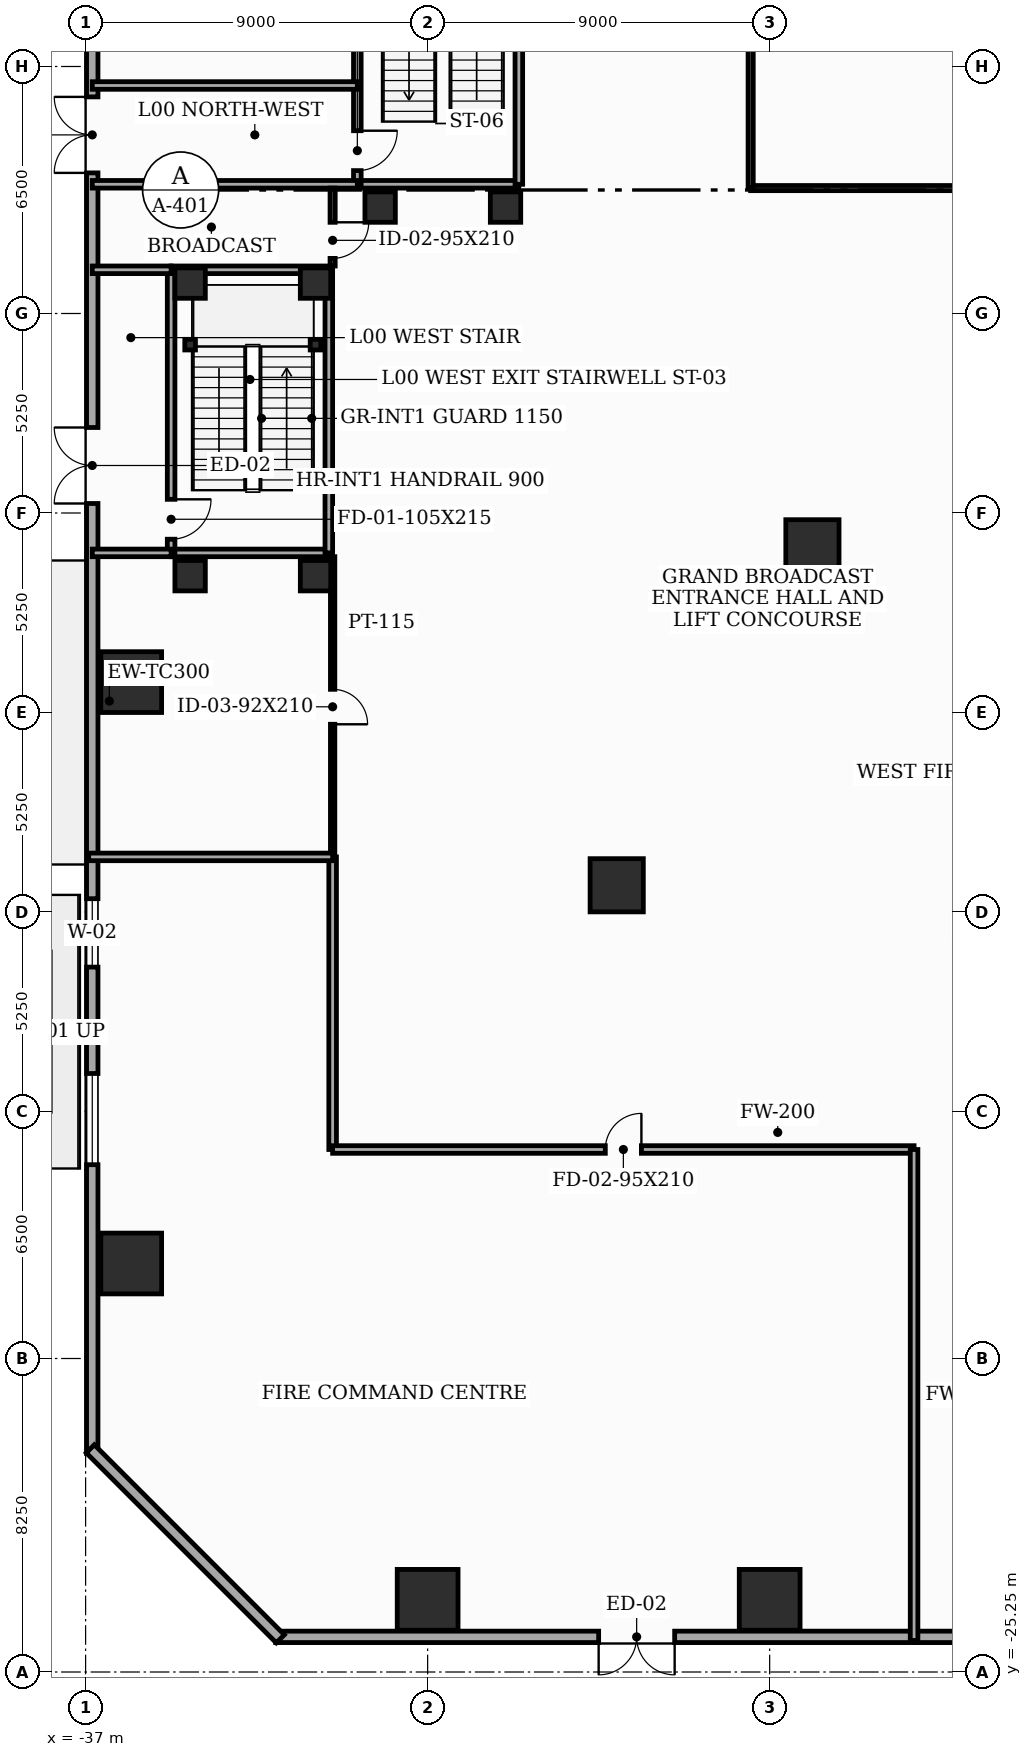
"""IFC4 building model, lengths in metres.
Left out: names, types, materials, properties, quantities, classifications, styles, units other than length and angle.
Written with IfcOpenShell. Run it as: python <this file> out.ifc"""

import sys

from ifc_helpers import new_model, si_unit, direction, frame, frame_2d, origin, origin_2d, place, context, subcontext, project, spatial, rectangle, i_section, extrude, element, fill, save


model = new_model("IFC4")
c1 = context("Model", 3, precision=1e-05, world=origin(), true_north=direction((0.0, 1.0)))
c2 = subcontext(c1, "Body", "Model", "MODEL_VIEW")
j1 = project(units=[si_unit("LENGTHUNIT", "METRE"), si_unit("PLANEANGLEUNIT", "RADIAN")], contexts=[c1])
p1 = place(None, origin())
s1 = spatial("IfcSite", under=j1, at=p1, CompositionType="ELEMENT")
p2 = place(p1, origin())
s2 = spatial("IfcBuilding", under=s1, at=p2, CompositionType="ELEMENT")
p3 = place(p2, origin())
s3 = spatial("IfcBuildingStorey", under=s2, at=p3, CompositionType="ELEMENT", Elevation=0.0)
for number, where, z_axis, x_axis in (
    (1, (-28.0, -23.35, 0.0), (0.0, 0.0, 1.0), (1.0, 0.0, 0.0)),
    (2, (-19.0, -23.35, 0.0), (0.0, 0.0, 1.0), (1.0, 0.0, 0.0)),
    (3, (-35.8, 0.8, 0.0), (0.0, 0.0, 1.0), (1.0, 0.0, 0.0)),
    (4, (-35.8, -14.5, 0.0), (0.0, 0.0, 1.0), (1.0, 0.0, 0.0)),
):
    element("IfcColumn", number, at=place(p3, frame(where, z_axis=z_axis, x_axis=x_axis)), inside=s3, PredefinedType="COLUMN", context=c2, shape_type="SweptSolid", body=[
        extrude(rectangle(XDim=1.6, YDim=1.6, at=origin_2d()), origin(), (0.0, 0.0, 1.0), 5.2),
    ])
for number, where, z_axis, x_axis in (
    (5, (-17.875, 4.373, 0.0), (0.0, 0.0, 1.0), (1.0, 0.0, 0.0)),
    (6, (-23.025, -4.547, 0.0), (0.0, 0.0, 1.0), (1.0, 0.0, 0.0)),
):
    element("IfcColumn", number, at=place(p3, frame(where, z_axis=z_axis, x_axis=x_axis)), inside=s3, PredefinedType="COLUMN", context=c2, shape_type="SweptSolid", body=[
        extrude(rectangle(XDim=1.4, YDim=1.4, at=origin_2d()), origin(), (0.0, 0.0, 1.0), 5.2),
    ])
for number, where, z_axis, x_axis in (
    (7, (-34.25, 3.6, 0.0), (0.0, 0.0, 1.0), (1.0, 0.0, 0.0)),
    (8, (-30.95, 3.6, 0.0), (0.0, 0.0, 1.0), (1.0, 0.0, 0.0)),
    (9, (-30.95, 11.3, 0.0), (0.0, 0.0, 1.0), (1.0, 0.0, 0.0)),
    (10, (-34.25, 11.3, 0.0), (0.0, 0.0, 1.0), (1.0, 0.0, 0.0)),
):
    element("IfcColumn", number, at=place(p3, frame(where, z_axis=z_axis, x_axis=x_axis)), inside=s3, PredefinedType="COLUMN", context=c2, shape_type="SweptSolid", body=[
        extrude(rectangle(XDim=0.8, YDim=0.8, at=origin_2d()), origin(), (0.0, 0.0, 1.0), 5.2),
    ])
for number, where, z_axis, x_axis in (
    (11, (-34.25, 9.68, 0.0), (0.0, 0.0, 1.0), (1.0, 0.0, 0.0)),
    (12, (-30.95, 9.68, 0.0), (0.0, 0.0, 1.0), (1.0, 0.0, 0.0)),
):
    element("IfcColumn", number, at=place(p3, frame(where, z_axis=z_axis, x_axis=x_axis)), inside=s3, PredefinedType="PILASTER", context=c2, shape_type="SweptSolid", body=[
        extrude(i_section(OverallWidth=0.28, OverallDepth=0.28, WebThickness=0.01, FlangeThickness=0.018, at=origin_2d()), origin(), (0.0, 0.0, 1.0), 5.2),
    ])
for number, where, z_axis, x_axis in (
    (13, (-29.25, 13.3, 0.0), (0.0, 0.0, 1.0), (1.0, 0.0, 0.0)),
    (14, (-25.95, 13.3, 0.0), (0.0, 0.0, 1.0), (1.0, 0.0, 0.0)),
):
    element("IfcColumn", number, at=place(p3, frame(where, z_axis=z_axis, x_axis=x_axis)), inside=s3, PredefinedType="COLUMN", context=c2, shape_type="SweptSolid", body=[
        extrude(rectangle(XDim=0.8, YDim=0.8, at=origin_2d()), origin(), (0.0, 0.0, 1.0), 5.2),
    ])
p4 = place(p3, frame((-32.0, -24.325, 0.0), z_axis=(0.0, 0.0, 1.0), x_axis=(1.0, 0.0, 0.0)))
e15 = element("IfcWall", 15, at=p4, inside=s3, PredefinedType="SOLIDWALL", context=c2, shape_type="SweptSolid", body=[
    extrude(rectangle(XDim=64.0, YDim=0.3, at=frame_2d((32.0, 0.0))), origin(), (0.0, 0.0, 1.0), 4.95),
])
p5 = place(p4, frame((8.5, 0.0, 0.0)))
e16 = element("IfcOpeningElement", 16, at=p5, cuts=e15, PredefinedType="OPENING", context=c2, shape_type="SweptSolid", body=[
    extrude(rectangle(XDim=2.0, YDim=2.2, at=frame_2d((1.0, 1.1))), frame((0.0, 0.16, 0.0), z_axis=(0.0, -1.0, 0.0), x_axis=(1.0, 0.0, 0.0)), (0.0, 0.0, 1.0), 0.32),
])
p6 = place(p4, frame((22.8, 0.0, 0.0)))
e17 = element("IfcOpeningElement", 17, at=p6, cuts=e15, PredefinedType="OPENING", context=c2, shape_type="SweptSolid", body=[
    extrude(rectangle(XDim=2.2, YDim=2.4, at=frame_2d((1.1, 1.2))), frame((0.0, 0.16, 0.0), z_axis=(0.0, -1.0, 0.0), x_axis=(1.0, 0.0, 0.0)), (0.0, 0.0, 1.0), 0.32),
])
p7 = place(p4, frame((30.4, 0.0, 0.0)))
e18 = element("IfcOpeningElement", 18, at=p7, cuts=e15, PredefinedType="OPENING", context=c2, shape_type="SweptSolid", body=[
    extrude(rectangle(XDim=2.2, YDim=2.4, at=frame_2d((1.1, 1.2))), frame((0.0, 0.16, 0.0), z_axis=(0.0, -1.0, 0.0), x_axis=(1.0, 0.0, 0.0)), (0.0, 0.0, 1.0), 0.32),
])
p8 = place(p4, frame((38.2, 0.0, 0.0)))
e19 = element("IfcOpeningElement", 19, at=p8, cuts=e15, PredefinedType="OPENING", context=c2, shape_type="SweptSolid", body=[
    extrude(rectangle(XDim=2.0, YDim=2.2, at=frame_2d((1.0, 1.1))), frame((0.0, 0.16, 0.0), z_axis=(0.0, -1.0, 0.0), x_axis=(1.0, 0.0, 0.0)), (0.0, 0.0, 1.0), 0.32),
])
p9 = place(p3, frame((-36.825, 28.5, 0.0), z_axis=(0.0, 0.0, 1.0), x_axis=(0.0, -1.0, 0.0)))
e20 = element("IfcWall", 20, at=p9, inside=s3, PredefinedType="SOLIDWALL", context=c2, shape_type="SweptSolid", body=[
    extrude(rectangle(XDim=48.0, YDim=0.3, at=frame_2d((24.0, 0.0))), origin(), (0.0, 0.0, 1.0), 4.95),
])
p10 = place(p9, frame((1.1, 0.0, 0.0)))
e21 = element("IfcOpeningElement", 21, at=p10, cuts=e20, PredefinedType="OPENING", context=c2, shape_type="SweptSolid", body=[
    extrude(rectangle(XDim=2.0, YDim=2.2, at=frame_2d((1.0, 1.1))), frame((0.0, 0.16, 0.0), z_axis=(0.0, -1.0, 0.0), x_axis=(1.0, 0.0, 0.0)), (0.0, 0.0, 1.0), 0.32),
])
p11 = place(p9, frame((12.3, 0.0, 0.0)))
e22 = element("IfcOpeningElement", 22, at=p11, cuts=e20, PredefinedType="OPENING", context=c2, shape_type="SweptSolid", body=[
    extrude(rectangle(XDim=2.0, YDim=2.2, at=frame_2d((1.0, 1.1))), frame((0.0, 0.16, 0.0), z_axis=(0.0, -1.0, 0.0), x_axis=(1.0, 0.0, 0.0)), (0.0, 0.0, 1.0), 0.32),
])
p12 = place(p9, frame((21.0, 0.0, 0.0)))
e23 = element("IfcOpeningElement", 23, at=p12, cuts=e20, PredefinedType="OPENING", context=c2, shape_type="SweptSolid", body=[
    extrude(rectangle(XDim=2.0, YDim=2.2, at=frame_2d((1.0, 1.1))), frame((0.0, 0.16, 0.0), z_axis=(0.0, -1.0, 0.0), x_axis=(1.0, 0.0, 0.0)), (0.0, 0.0, 1.0), 0.32),
])
p13 = place(p9, frame((7.0, 0.0, 0.9)))
e24 = element("IfcOpeningElement", 24, at=p13, cuts=e20, PredefinedType="OPENING", context=c2, shape_type="SweptSolid", body=[
    extrude(rectangle(XDim=2.4, YDim=1.35, at=frame_2d((1.2, 0.675))), frame((0.0, 0.16, 0.0), z_axis=(0.0, -1.0, 0.0), x_axis=(1.0, 0.0, 0.0)), (0.0, 0.0, 1.0), 0.32),
])
p14 = place(p9, frame((33.4, 0.0, 0.9)))
e25 = element("IfcOpeningElement", 25, at=p14, cuts=e20, PredefinedType="OPENING", context=c2, shape_type="SweptSolid", body=[
    extrude(rectangle(XDim=1.8, YDim=1.35, at=frame_2d((0.9, 0.675))), frame((0.0, 0.16, 0.0), z_axis=(0.0, -1.0, 0.0), x_axis=(1.0, 0.0, 0.0)), (0.0, 0.0, 1.0), 0.32),
])
p15 = place(p9, frame((38.0, 0.0, 0.9)))
e26 = element("IfcOpeningElement", 26, at=p15, cuts=e20, PredefinedType="OPENING", context=c2, shape_type="SweptSolid", body=[
    extrude(rectangle(XDim=2.4, YDim=1.35, at=frame_2d((1.2, 0.675))), frame((0.0, 0.16, 0.0), z_axis=(0.0, -1.0, 0.0), x_axis=(1.0, 0.0, 0.0)), (0.0, 0.0, 1.0), 0.32),
])
p16 = place(p3, frame((-36.876, -19.376, 0.0), z_axis=(0.0, 0.0, 1.0), x_axis=(0.707106781187, -0.707106781187, 0.0)))
e27 = element("IfcWall", 27, at=p16, inside=s3, PredefinedType="SOLIDWALL", context=c2, shape_type="SweptSolid", body=[
    extrude(rectangle(XDim=7.071, YDim=0.3, at=frame_2d((3.536, 0.0))), origin(), (0.0, 0.0, 1.0), 4.95),
])
p17 = place(p3, frame((-34.75, 4.2, 0.0), z_axis=(0.0, 0.0, 1.0), x_axis=(1.0, 0.0, 0.0)))
e28 = element("IfcWall", 28, at=p17, inside=s3, PredefinedType="SOLIDWALL", context=c2, shape_type="SweptSolid", body=[
    extrude(rectangle(XDim=4.15, YDim=0.2, at=frame_2d((2.075, 0.0))), origin(), (0.0, 0.0, 1.0), 4.95),
])
p18 = place(p3, frame((-30.6, 4.2, 0.0), z_axis=(0.0, 0.0, 1.0), x_axis=(0.0, 1.0, 0.0)))
e29 = element("IfcWall", 29, at=p18, inside=s3, PredefinedType="SOLIDWALL", context=c2, shape_type="SweptSolid", body=[
    extrude(rectangle(XDim=7.45, YDim=0.2, at=frame_2d((3.725, 0.0))), origin(), (0.0, 0.0, 1.0), 4.95),
])
p19 = place(p3, frame((-30.6, 11.65, 0.0), z_axis=(0.0, 0.0, 1.0), x_axis=(-1.0, 0.0, 0.0)))
e30 = element("IfcWall", 30, at=p19, inside=s3, PredefinedType="SOLIDWALL", context=c2, shape_type="SweptSolid", body=[
    extrude(rectangle(XDim=4.15, YDim=0.2, at=frame_2d((2.075, 0.0))), origin(), (0.0, 0.0, 1.0), 4.95),
])
p20 = place(p3, frame((-34.75, 11.65, 0.0), z_axis=(0.0, 0.0, 1.0), x_axis=(0.0, -1.0, 0.0)))
e31 = element("IfcWall", 31, at=p20, inside=s3, PredefinedType="SOLIDWALL", context=c2, shape_type="SweptSolid", body=[
    extrude(rectangle(XDim=7.45, YDim=0.2, at=frame_2d((3.725, 0.0))), origin(), (0.0, 0.0, 1.0), 4.95),
])
p21 = place(p20, frame((6.04, 0.0, 0.0)))
e32 = element("IfcOpeningElement", 32, at=p21, cuts=e31, PredefinedType="OPENING", context=c2, shape_type="SweptSolid", body=[
    extrude(rectangle(XDim=1.05, YDim=2.15, at=frame_2d((0.525, 1.075))), frame((0.0, 0.11, 0.0), z_axis=(0.0, -1.0, 0.0), x_axis=(1.0, 0.0, 0.0)), (0.0, 0.0, 1.0), 0.22),
])
p22 = place(p3, frame((-29.85, 13.9, 0.0), z_axis=(0.0, 0.0, 1.0), x_axis=(1.0, 0.0, 0.0)))
e33 = element("IfcWall", 33, at=p22, inside=s3, PredefinedType="SOLIDWALL", context=c2, shape_type="SweptSolid", body=[
    extrude(rectangle(XDim=4.25, YDim=0.2, at=frame_2d((2.125, 0.0))), origin(), (0.0, 0.0, 1.0), 4.435),
])
p23 = place(p3, frame((-25.6, 13.9, 0.0), z_axis=(0.0, 0.0, 1.0), x_axis=(0.0, 1.0, 0.0)))
e34 = element("IfcWall", 34, at=p23, inside=s3, PredefinedType="SOLIDWALL", context=c2, shape_type="SweptSolid", body=[
    extrude(rectangle(XDim=7.45, YDim=0.2, at=frame_2d((3.725, 0.0))), origin(), (0.0, 0.0, 1.0), 4.435),
])
p24 = place(p3, frame((-29.85, 21.35, 0.0), z_axis=(0.0, 0.0, 1.0), x_axis=(0.0, -1.0, 0.0)))
e35 = element("IfcWall", 35, at=p24, inside=s3, PredefinedType="SOLIDWALL", context=c2, shape_type="SweptSolid", body=[
    extrude(rectangle(XDim=7.45, YDim=0.2, at=frame_2d((3.725, 0.0))), origin(), (0.0, 0.0, 1.0), 4.435),
])
p25 = place(p24, frame((6.04, 0.0, 0.0)))
e36 = element("IfcOpeningElement", 36, at=p25, cuts=e35, PredefinedType="OPENING", context=c2, shape_type="SweptSolid", body=[
    extrude(rectangle(XDim=1.05, YDim=2.15, at=frame_2d((0.525, 1.075))), frame((0.0, 0.11, 0.0), z_axis=(0.0, -1.0, 0.0), x_axis=(1.0, 0.0, 0.0)), (0.0, 0.0, 1.0), 0.22),
])
for number, where, z_axis, x_axis in (
    (37, (-36.825, 4.2, 0.0), (0.0, 0.0, 1.0), (1.0, 0.0, 0.0)),
    (38, (-34.75, 11.65, 0.0), (0.0, 0.0, 1.0), (-1.0, 0.0, 0.0)),
):
    element("IfcWall", number, at=place(p3, frame(where, z_axis=z_axis, x_axis=x_axis)), inside=s3, PredefinedType="SOLIDWALL", context=c2, shape_type="SweptSolid", body=[
        extrude(rectangle(XDim=2.075, YDim=0.2, at=frame_2d((1.038, 0.0))), origin(), (0.0, 0.0, 1.0), 4.235),
    ])
for number, where, z_axis, x_axis in (
    (39, (-36.825, 13.9, 0.0), (0.0, 0.0, 1.0), (1.0, 0.0, 0.0)),
    (40, (-29.85, 16.5, 0.0), (0.0, 0.0, 1.0), (-1.0, 0.0, 0.0)),
):
    element("IfcWall", number, at=place(p3, frame(where, z_axis=z_axis, x_axis=x_axis)), inside=s3, PredefinedType="SOLIDWALL", context=c2, shape_type="SweptSolid", body=[
        extrude(rectangle(XDim=6.975, YDim=0.2, at=frame_2d((3.487, 0.0))), origin(), (0.0, 0.0, 1.0), 4.235),
    ])
p26 = place(p3, frame((-30.5, -3.8, 0.0), z_axis=(0.0, 0.0, 1.0), x_axis=(0.0, -1.0, 0.0)))
e41 = element("IfcWall", 41, at=p26, inside=s3, PredefinedType="SOLIDWALL", context=c2, shape_type="SweptSolid", body=[
    extrude(rectangle(XDim=7.7, YDim=0.2, at=frame_2d((3.85, 0.0))), origin(), (0.0, 0.0, 1.0), 3.435),
])
p27 = place(p3, frame((-30.5, -11.5, 0.0), z_axis=(0.0, 0.0, 1.0), x_axis=(1.0, 0.0, 0.0)))
e42 = element("IfcWall", 42, at=p27, inside=s3, PredefinedType="SOLIDWALL", context=c2, shape_type="SweptSolid", body=[
    extrude(rectangle(XDim=15.3, YDim=0.2, at=frame_2d((7.65, 0.0))), origin(), (0.0, 0.0, 1.0), 3.435),
])
p28 = place(p27, frame((7.175, 0.0, 0.0)))
e43 = element("IfcOpeningElement", 43, at=p28, cuts=e42, PredefinedType="OPENING", context=c2, shape_type="SweptSolid", body=[
    extrude(rectangle(XDim=0.95, YDim=2.1, at=frame_2d((0.475, 1.05))), frame((0.0, 0.11, 0.0), z_axis=(0.0, -1.0, 0.0), x_axis=(1.0, 0.0, 0.0)), (0.0, 0.0, 1.0), 0.22),
])
p29 = place(p3, frame((-15.2, -11.5, 0.0), z_axis=(0.0, 0.0, 1.0), x_axis=(0.0, -1.0, 0.0)))
e44 = element("IfcWall", 44, at=p29, inside=s3, PredefinedType="SOLIDWALL", context=c2, shape_type="SweptSolid", body=[
    extrude(rectangle(XDim=12.92, YDim=0.2, at=frame_2d((6.46, 0.0))), origin(), (0.0, 0.0, 1.0), 3.435),
])
p30 = place(p3, frame((14.0, 13.8, 0.0), z_axis=(0.0, 0.0, 1.0), x_axis=(-1.0, 0.0, 0.0)))
e45 = element("IfcWall", 45, at=p30, inside=s3, PredefinedType="PARTITIONING", context=c2, shape_type="SweptSolid", body=[
    extrude(rectangle(XDim=33.5, YDim=0.135, at=frame_2d((16.75, 0.0))), origin(), (0.0, 0.0, 1.0), 3.435),
])
p31 = place(p30, frame((16.275, 0.0, 0.0)))
e46 = element("IfcOpeningElement", 46, at=p31, cuts=e45, PredefinedType="OPENING", context=c2, shape_type="SweptSolid", body=[
    extrude(rectangle(XDim=0.95, YDim=2.1, at=frame_2d((0.475, 1.05))), frame((0.0, 0.077, 0.0), z_axis=(0.0, -1.0, 0.0), x_axis=(1.0, 0.0, 0.0)), (0.0, 0.0, 1.0), 0.155),
])
p32 = place(p3, frame((-19.5, 13.8, 0.0), z_axis=(0.0, 0.0, 1.0), x_axis=(0.0, 1.0, 0.0)))
e47 = element("IfcWall", 47, at=p32, inside=s3, PredefinedType="PARTITIONING", context=c2, shape_type="SweptSolid", body=[
    extrude(rectangle(XDim=14.6, YDim=0.135, at=frame_2d((7.3, 0.0))), origin(), (0.0, 0.0, 1.0), 3.435),
])
p33 = place(p3, frame((-30.5, 13.8, 0.0), z_axis=(0.0, 0.0, 1.0), x_axis=(0.0, -1.0, 0.0)))
e48 = element("IfcWall", 48, at=p33, inside=s3, PredefinedType="PARTITIONING", context=c2, shape_type="SweptSolid", body=[
    extrude(rectangle(XDim=2.05, YDim=0.135, at=frame_2d((1.025, 0.0))), origin(), (0.0, 0.0, 1.0), 4.95),
])
p34 = place(p33, frame((0.9, 0.0, 0.0)))
e49 = element("IfcOpeningElement", 49, at=p34, cuts=e48, PredefinedType="OPENING", context=c2, shape_type="SweptSolid", body=[
    extrude(rectangle(XDim=0.95, YDim=2.1, at=frame_2d((0.475, 1.05))), frame((0.0, 0.077, 0.0), z_axis=(0.0, -1.0, 0.0), x_axis=(1.0, 0.0, 0.0)), (0.0, 0.0, 1.0), 0.155),
])
p35 = place(p3, frame((-30.5, 4.1, 0.0), z_axis=(0.0, 0.0, 1.0), x_axis=(0.0, -1.0, 0.0)))
e50 = element("IfcWall", 50, at=p35, inside=s3, PredefinedType="PARTITIONING", context=c2, shape_type="SweptSolid", body=[
    extrude(rectangle(XDim=7.9, YDim=0.115, at=frame_2d((3.95, 0.0))), origin(), (0.0, 0.0, 1.0), 3.435),
])
p36 = place(p35, frame((3.49, 0.0, 0.0)))
e51 = element("IfcOpeningElement", 51, at=p36, cuts=e50, PredefinedType="OPENING", context=c2, shape_type="SweptSolid", body=[
    extrude(rectangle(XDim=0.92, YDim=2.1, at=frame_2d((0.46, 1.05))), frame((0.0, 0.067, 0.0), z_axis=(0.0, -1.0, 0.0), x_axis=(1.0, 0.0, 0.0)), (0.0, 0.0, 1.0), 0.135),
])
p37 = place(p3, frame((-30.5, -3.8, 0.0), z_axis=(0.0, 0.0, 1.0), x_axis=(-1.0, 0.0, 0.0)))
e52 = element("IfcWall", 52, at=p37, inside=s3, PredefinedType="SOLIDWALL", context=c2, shape_type="SweptSolid", body=[
    extrude(rectangle(XDim=6.42, YDim=0.2, at=frame_2d((3.21, 0.0))), origin(), (0.0, 0.0, 1.0), 4.235),
])
p38 = place(p5, frame((2.0, 0.0, 0.0), z_axis=(0.0, 0.0, 1.0), x_axis=(-1.0, 0.0, 0.0)))
e53 = element("IfcDoor", 53, at=p38, inside=s3, OperationType="DOUBLE_DOOR_SINGLE_SWING", PredefinedType="DOOR", context=c2, shape_type="SweptSolid", body=[
    extrude(rectangle(XDim=2.0, YDim=2.2, at=frame_2d((1.0, 1.1))), frame((0.0, 0.025, 0.0), z_axis=(0.0, -1.0, 0.0), x_axis=(1.0, 0.0, 0.0)), (0.0, 0.0, 1.0), 0.05),
])
fill(e16, e53)
p39 = place(p11, frame((2.0, 0.0, 0.0), z_axis=(0.0, 0.0, 1.0), x_axis=(-1.0, 0.0, 0.0)))
e54 = element("IfcDoor", 54, at=p39, inside=s3, OperationType="DOUBLE_DOOR_SINGLE_SWING", PredefinedType="DOOR", context=c2, shape_type="SweptSolid", body=[
    extrude(rectangle(XDim=2.0, YDim=2.2, at=frame_2d((1.0, 1.1))), frame((0.0, 0.025, 0.0), z_axis=(0.0, -1.0, 0.0), x_axis=(1.0, 0.0, 0.0)), (0.0, 0.0, 1.0), 0.05),
])
fill(e22, e54)
p40 = place(p12, frame((2.0, 0.0, 0.0), z_axis=(0.0, 0.0, 1.0), x_axis=(-1.0, 0.0, 0.0)))
e55 = element("IfcDoor", 55, at=p40, inside=s3, OperationType="DOUBLE_DOOR_SINGLE_SWING", PredefinedType="DOOR", context=c2, shape_type="SweptSolid", body=[
    extrude(rectangle(XDim=2.0, YDim=2.2, at=frame_2d((1.0, 1.1))), frame((0.0, 0.025, 0.0), z_axis=(0.0, -1.0, 0.0), x_axis=(1.0, 0.0, 0.0)), (0.0, 0.0, 1.0), 0.05),
])
fill(e23, e55)
p41 = place(p14, origin())
e56 = element("IfcWindow", 56, at=p41, inside=s3, PartitioningType="SINGLE_PANEL", PredefinedType="WINDOW", context=c2, shape_type="SweptSolid", body=[
    extrude(rectangle(XDim=1.8, YDim=1.35, at=frame_2d((0.9, 0.675))), frame((0.0, 0.03, 0.0), z_axis=(0.0, -1.0, 0.0), x_axis=(1.0, 0.0, 0.0)), (0.0, 0.0, 1.0), 0.06),
])
fill(e25, e56)
p42 = place(p15, origin())
e57 = element("IfcWindow", 57, at=p42, inside=s3, PartitioningType="SINGLE_PANEL", PredefinedType="WINDOW", context=c2, shape_type="SweptSolid", body=[
    extrude(rectangle(XDim=2.4, YDim=1.35, at=frame_2d((1.2, 0.675))), frame((0.0, 0.03, 0.0), z_axis=(0.0, -1.0, 0.0), x_axis=(1.0, 0.0, 0.0)), (0.0, 0.0, 1.0), 0.06),
])
fill(e26, e57)
p43 = place(p21, origin())
e58 = element("IfcDoor", 58, at=p43, inside=s3, OperationType="SINGLE_SWING_LEFT", PredefinedType="DOOR", context=c2, shape_type="SweptSolid", body=[
    extrude(rectangle(XDim=1.05, YDim=2.15, at=frame_2d((0.525, 1.075))), frame((0.0, 0.025, 0.0), z_axis=(0.0, -1.0, 0.0), x_axis=(1.0, 0.0, 0.0)), (0.0, 0.0, 1.0), 0.05),
])
fill(e32, e58)
p44 = place(p25, origin())
e59 = element("IfcDoor", 59, at=p44, inside=s3, OperationType="SINGLE_SWING_LEFT", PredefinedType="DOOR", context=c2, shape_type="SweptSolid", body=[
    extrude(rectangle(XDim=1.05, YDim=2.15, at=frame_2d((0.525, 1.075))), frame((0.0, 0.025, 0.0), z_axis=(0.0, -1.0, 0.0), x_axis=(1.0, 0.0, 0.0)), (0.0, 0.0, 1.0), 0.05),
])
fill(e36, e59)
p45 = place(p28, origin())
e60 = element("IfcDoor", 60, at=p45, inside=s3, OperationType="SINGLE_SWING_RIGHT", PredefinedType="DOOR", context=c2, shape_type="SweptSolid", body=[
    extrude(rectangle(XDim=0.95, YDim=2.1, at=frame_2d((0.475, 1.05))), frame((0.0, 0.025, 0.0), z_axis=(0.0, -1.0, 0.0), x_axis=(1.0, 0.0, 0.0)), (0.0, 0.0, 1.0), 0.05),
])
fill(e43, e60)
p46 = place(p34, origin())
e61 = element("IfcDoor", 61, at=p46, inside=s3, OperationType="SINGLE_SWING_LEFT", PredefinedType="DOOR", context=c2, shape_type="SweptSolid", body=[
    extrude(rectangle(XDim=0.95, YDim=2.1, at=frame_2d((0.475, 1.05))), frame((0.0, 0.025, 0.0), z_axis=(0.0, -1.0, 0.0), x_axis=(1.0, 0.0, 0.0)), (0.0, 0.0, 1.0), 0.05),
])
fill(e49, e61)
p47 = place(p36, origin())
e62 = element("IfcDoor", 62, at=p47, inside=s3, OperationType="SINGLE_SWING_RIGHT", PredefinedType="DOOR", context=c2, shape_type="SweptSolid", body=[
    extrude(rectangle(XDim=0.92, YDim=2.1, at=frame_2d((0.46, 1.05))), frame((0.0, 0.025, 0.0), z_axis=(0.0, -1.0, 0.0), x_axis=(1.0, 0.0, 0.0)), (0.0, 0.0, 1.0), 0.05),
])
fill(e51, e62)
save(model, sys.argv[1])
